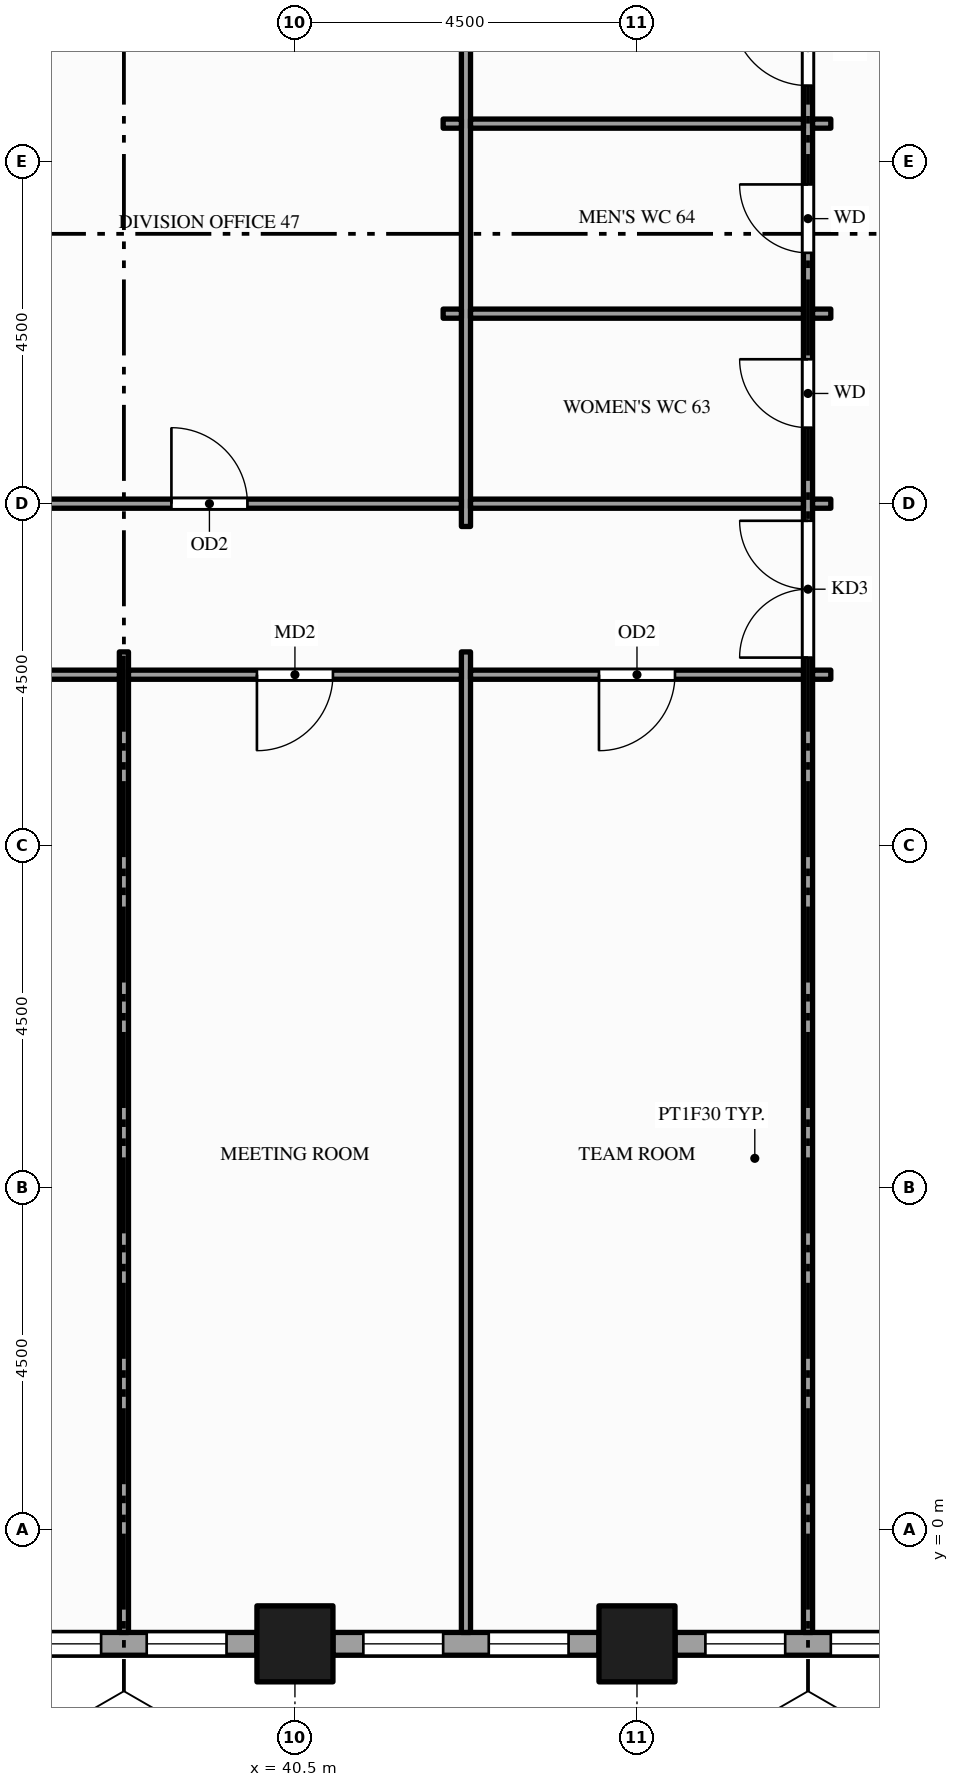
"""IFC4 building model, lengths in metres.
Left out: names, types, materials, properties, quantities, classifications, styles, units other than length and angle.
Written with IfcOpenShell. Run it as: python <this file> out.ifc"""

import sys

from ifc_helpers import new_model, si_unit, direction, frame, frame_2d, origin, origin_2d, place, context, subcontext, project, spatial, rectangle, hollow_rectangle, extrude, element, fill, save


model = new_model("IFC4")
c1 = context("Model", 3, precision=1e-05, world=origin(), true_north=direction((0.0, 1.0)))
c2 = subcontext(c1, "Body", "Model", "MODEL_VIEW")
j1 = project(units=[si_unit("LENGTHUNIT", "METRE"), si_unit("PLANEANGLEUNIT", "RADIAN")], contexts=[c1])
p1 = place(None, origin())
s1 = spatial("IfcSite", under=j1, at=p1, CompositionType="ELEMENT")
p2 = place(p1, origin())
s2 = spatial("IfcBuilding", under=s1, at=p2, CompositionType="ELEMENT")
p3 = place(p2, frame((0.0, 0.0, 127.0)))
s3 = spatial("IfcBuildingStorey", under=s2, at=p3, CompositionType="ELEMENT", Elevation=127.0)
for number, where, z_axis, x_axis in (
    (1, (40.5, -1.5, -0.15), (0.0, 0.0, 1.0), (1.0, 0.0, 0.0)),
    (2, (45.0, -1.5, -0.15), (0.0, 0.0, 1.0), (1.0, 0.0, 0.0)),
):
    element("IfcColumn", number, at=place(p3, frame(where, z_axis=z_axis, x_axis=x_axis)), inside=s3, PredefinedType="COLUMN", context=c2, shape_type="SweptSolid", body=[
        extrude(hollow_rectangle(XDim=1.0, YDim=1.0, WallThickness=0.05, at=origin_2d()), origin(), (0.0, 0.0, 1.0), 3.9),
    ])
p4 = place(p3, frame((36.5, -1.5, 0.0), z_axis=(0.0, 0.0, 1.0), x_axis=(1.0, 0.0, 0.0)))
e3 = element("IfcWall", 3, at=p4, inside=s3, PredefinedType="STANDARD", context=c2, shape_type="SweptSolid", body=[
    extrude(rectangle(XDim=3.5, YDim=0.3, at=frame_2d((1.75, 0.0))), origin(), (0.0, 0.0, 1.0), 3.054),
])
p5 = place(p4, frame((0.4, 0.0, 0.9)))
e4 = element("IfcOpeningElement", 4, at=p5, cuts=e3, PredefinedType="OPENING", context=c2, shape_type="SweptSolid", body=[
    extrude(rectangle(XDim=1.05, YDim=2.0, at=frame_2d((0.525, 1.0))), frame((0.0, 0.16, 0.0), z_axis=(0.0, -1.0, 0.0), x_axis=(1.0, 0.0, 0.0)), (0.0, 0.0, 1.0), 0.32),
])
p6 = place(p4, frame((2.05, 0.0, 0.9)))
e5 = element("IfcOpeningElement", 5, at=p6, cuts=e3, PredefinedType="OPENING", context=c2, shape_type="SweptSolid", body=[
    extrude(rectangle(XDim=1.05, YDim=2.0, at=frame_2d((0.525, 1.0))), frame((0.0, 0.16, 0.0), z_axis=(0.0, -1.0, 0.0), x_axis=(1.0, 0.0, 0.0)), (0.0, 0.0, 1.0), 0.32),
])
p7 = place(p3, frame((41.0, -1.5, 0.0), z_axis=(0.0, 0.0, 1.0), x_axis=(1.0, 0.0, 0.0)))
e6 = element("IfcWall", 6, at=p7, inside=s3, PredefinedType="STANDARD", context=c2, shape_type="SweptSolid", body=[
    extrude(rectangle(XDim=3.5, YDim=0.3, at=frame_2d((1.75, 0.0))), origin(), (0.0, 0.0, 1.0), 3.054),
])
p8 = place(p7, frame((0.4, 0.0, 0.9)))
e7 = element("IfcOpeningElement", 7, at=p8, cuts=e6, PredefinedType="OPENING", context=c2, shape_type="SweptSolid", body=[
    extrude(rectangle(XDim=1.05, YDim=2.0, at=frame_2d((0.525, 1.0))), frame((0.0, 0.16, 0.0), z_axis=(0.0, -1.0, 0.0), x_axis=(1.0, 0.0, 0.0)), (0.0, 0.0, 1.0), 0.32),
])
p9 = place(p7, frame((2.05, 0.0, 0.9)))
e8 = element("IfcOpeningElement", 8, at=p9, cuts=e6, PredefinedType="OPENING", context=c2, shape_type="SweptSolid", body=[
    extrude(rectangle(XDim=1.05, YDim=2.0, at=frame_2d((0.525, 1.0))), frame((0.0, 0.16, 0.0), z_axis=(0.0, -1.0, 0.0), x_axis=(1.0, 0.0, 0.0)), (0.0, 0.0, 1.0), 0.32),
])
p10 = place(p3, frame((45.5, -1.5, 0.0), z_axis=(0.0, 0.0, 1.0), x_axis=(1.0, 0.0, 0.0)))
e9 = element("IfcWall", 9, at=p10, inside=s3, PredefinedType="STANDARD", context=c2, shape_type="SweptSolid", body=[
    extrude(rectangle(XDim=3.5, YDim=0.3, at=frame_2d((1.75, 0.0))), origin(), (0.0, 0.0, 1.0), 3.054),
])
p11 = place(p10, frame((0.4, 0.0, 0.9)))
e10 = element("IfcOpeningElement", 10, at=p11, cuts=e9, PredefinedType="OPENING", context=c2, shape_type="SweptSolid", body=[
    extrude(rectangle(XDim=1.05, YDim=2.0, at=frame_2d((0.525, 1.0))), frame((0.0, 0.16, 0.0), z_axis=(0.0, -1.0, 0.0), x_axis=(1.0, 0.0, 0.0)), (0.0, 0.0, 1.0), 0.32),
])
p12 = place(p10, frame((2.05, 0.0, 0.9)))
e11 = element("IfcOpeningElement", 11, at=p12, cuts=e9, PredefinedType="OPENING", context=c2, shape_type="SweptSolid", body=[
    extrude(rectangle(XDim=1.05, YDim=2.0, at=frame_2d((0.525, 1.0))), frame((0.0, 0.16, 0.0), z_axis=(0.0, -1.0, 0.0), x_axis=(1.0, 0.0, 0.0)), (0.0, 0.0, 1.0), 0.32),
])
for number, where, z_axis, x_axis in (
    (12, (38.25, -1.35, 0.0), (0.0, 0.0, 1.0), (0.0, 1.0, 0.0)),
    (13, (42.75, -1.35, 0.0), (0.0, 0.0, 1.0), (0.0, 1.0, 0.0)),
):
    element("IfcWall", number, at=place(p3, frame(where, z_axis=z_axis, x_axis=x_axis)), inside=s3, PredefinedType="PARTITIONING", context=c2, shape_type="SweptSolid", body=[
        extrude(rectangle(XDim=12.9, YDim=0.12, at=frame_2d((6.45, 0.0))), origin(), (0.0, 0.0, 1.0), 2.838),
    ])
p13 = place(p3, frame((42.75, 13.2, 0.0), z_axis=(0.0, 0.0, 1.0), x_axis=(0.0, 1.0, 0.0)))
e14 = element("IfcWall", 14, at=p13, inside=s3, PredefinedType="PARTITIONING", context=c2, shape_type="SweptSolid", body=[
    extrude(rectangle(XDim=7.65, YDim=0.12, at=frame_2d((3.825, 0.0))), origin(), (0.0, 0.0, 1.0), 2.838),
])
p14 = place(p3, frame((47.25, -1.35, 0.0), z_axis=(0.0, 0.0, 1.0), x_axis=(0.0, 1.0, 0.0)))
e15 = element("IfcWall", 15, at=p14, inside=s3, PredefinedType="PARTITIONING", context=c2, shape_type="SweptSolid", body=[
    extrude(rectangle(XDim=22.2, YDim=0.12, at=frame_2d((11.1, 0.0))), origin(), (0.0, 0.0, 1.0), 2.838),
])
p15 = place(p14, frame((12.825, 0.0, 0.0)))
e16 = element("IfcOpeningElement", 16, at=p15, cuts=e15, PredefinedType="OPENING", context=c2, shape_type="SweptSolid", body=[
    extrude(rectangle(XDim=1.8, YDim=2.1, at=frame_2d((0.9, 1.05))), frame((0.0, 0.07, 0.0), z_axis=(0.0, -1.0, 0.0), x_axis=(1.0, 0.0, 0.0)), (0.0, 0.0, 1.0), 0.14),
])
p16 = place(p14, frame((15.85, 0.0, 0.0)))
e17 = element("IfcOpeningElement", 17, at=p16, cuts=e15, PredefinedType="OPENING", context=c2, shape_type="SweptSolid", body=[
    extrude(rectangle(XDim=0.9, YDim=2.1, at=frame_2d((0.45, 1.05))), frame((0.0, 0.07, 0.0), z_axis=(0.0, -1.0, 0.0), x_axis=(1.0, 0.0, 0.0)), (0.0, 0.0, 1.0), 0.14),
])
p17 = place(p14, frame((18.15, 0.0, 0.0)))
e18 = element("IfcOpeningElement", 18, at=p17, cuts=e15, PredefinedType="OPENING", context=c2, shape_type="SweptSolid", body=[
    extrude(rectangle(XDim=0.9, YDim=2.1, at=frame_2d((0.45, 1.05))), frame((0.0, 0.07, 0.0), z_axis=(0.0, -1.0, 0.0), x_axis=(1.0, 0.0, 0.0)), (0.0, 0.0, 1.0), 0.14),
])
p18 = place(p14, frame((20.35, 0.0, 0.0)))
e19 = element("IfcOpeningElement", 19, at=p18, cuts=e15, PredefinedType="OPENING", context=c2, shape_type="SweptSolid", body=[
    extrude(rectangle(XDim=1.0, YDim=2.1, at=frame_2d((0.5, 1.05))), frame((0.0, 0.07, 0.0), z_axis=(0.0, -1.0, 0.0), x_axis=(1.0, 0.0, 0.0)), (0.0, 0.0, 1.0), 0.14),
])
p19 = place(p3, frame((31.56, 11.25, 0.0), z_axis=(0.0, 0.0, 1.0), x_axis=(1.0, 0.0, 0.0)))
e20 = element("IfcWall", 20, at=p19, inside=s3, PredefinedType="PARTITIONING", context=c2, shape_type="SweptSolid", body=[
    extrude(rectangle(XDim=6.63, YDim=0.12, at=frame_2d((3.315, 0.0))), origin(), (0.0, 0.0, 1.0), 2.838),
])
p20 = place(p19, frame((2.865, 0.0, 0.0)))
e21 = element("IfcOpeningElement", 21, at=p20, cuts=e20, PredefinedType="OPENING", context=c2, shape_type="SweptSolid", body=[
    extrude(rectangle(XDim=0.9, YDim=2.1, at=frame_2d((0.45, 1.05))), frame((0.0, 0.07, 0.0), z_axis=(0.0, -1.0, 0.0), x_axis=(1.0, 0.0, 0.0)), (0.0, 0.0, 1.0), 0.14),
])
p21 = place(p3, frame((38.31, 11.25, 0.0), z_axis=(0.0, 0.0, 1.0), x_axis=(1.0, 0.0, 0.0)))
e22 = element("IfcWall", 22, at=p21, inside=s3, PredefinedType="PARTITIONING", context=c2, shape_type="SweptSolid", body=[
    extrude(rectangle(XDim=4.38, YDim=0.12, at=frame_2d((2.19, 0.0))), origin(), (0.0, 0.0, 1.0), 2.838),
])
p22 = place(p21, frame((1.69, 0.0, 0.0)))
e23 = element("IfcOpeningElement", 23, at=p22, cuts=e22, PredefinedType="OPENING", context=c2, shape_type="SweptSolid", body=[
    extrude(rectangle(XDim=1.0, YDim=2.1, at=frame_2d((0.5, 1.05))), frame((0.0, 0.07, 0.0), z_axis=(0.0, -1.0, 0.0), x_axis=(1.0, 0.0, 0.0)), (0.0, 0.0, 1.0), 0.14),
])
p23 = place(p3, frame((42.81, 11.25, 0.0), z_axis=(0.0, 0.0, 1.0), x_axis=(1.0, 0.0, 0.0)))
e24 = element("IfcWall", 24, at=p23, inside=s3, PredefinedType="PARTITIONING", context=c2, shape_type="SweptSolid", body=[
    extrude(rectangle(XDim=4.38, YDim=0.12, at=frame_2d((2.19, 0.0))), origin(), (0.0, 0.0, 1.0), 2.838),
])
p24 = place(p23, frame((1.69, 0.0, 0.0)))
e25 = element("IfcOpeningElement", 25, at=p24, cuts=e24, PredefinedType="OPENING", context=c2, shape_type="SweptSolid", body=[
    extrude(rectangle(XDim=1.0, YDim=2.1, at=frame_2d((0.5, 1.05))), frame((0.0, 0.07, 0.0), z_axis=(0.0, -1.0, 0.0), x_axis=(1.0, 0.0, 0.0)), (0.0, 0.0, 1.0), 0.14),
])
p25 = place(p3, frame((47.31, 11.25, 0.0), z_axis=(0.0, 0.0, 1.0), x_axis=(1.0, 0.0, 0.0)))
e26 = element("IfcWall", 26, at=p25, inside=s3, PredefinedType="PARTITIONING", context=c2, shape_type="SweptSolid", body=[
    extrude(rectangle(XDim=0.24, YDim=0.12, at=frame_2d((0.12, 0.0))), origin(), (0.0, 0.0, 1.0), 2.838),
])
p26 = place(p3, frame((36.06, 13.5, 0.0), z_axis=(0.0, 0.0, 1.0), x_axis=(1.0, 0.0, 0.0)))
e27 = element("IfcWall", 27, at=p26, inside=s3, PredefinedType="PARTITIONING", context=c2, shape_type="SweptSolid", body=[
    extrude(rectangle(XDim=6.63, YDim=0.12, at=frame_2d((3.315, 0.0))), origin(), (0.0, 0.0, 1.0), 2.838),
])
p27 = place(p26, frame((2.815, 0.0, 0.0)))
e28 = element("IfcOpeningElement", 28, at=p27, cuts=e27, PredefinedType="OPENING", context=c2, shape_type="SweptSolid", body=[
    extrude(rectangle(XDim=1.0, YDim=2.1, at=frame_2d((0.5, 1.05))), frame((0.0, 0.07, 0.0), z_axis=(0.0, -1.0, 0.0), x_axis=(1.0, 0.0, 0.0)), (0.0, 0.0, 1.0), 0.14),
])
p28 = place(p3, frame((42.81, 13.5, 0.0), z_axis=(0.0, 0.0, 1.0), x_axis=(1.0, 0.0, 0.0)))
e29 = element("IfcWall", 29, at=p28, inside=s3, PredefinedType="PARTITIONING", context=c2, shape_type="SweptSolid", body=[
    extrude(rectangle(XDim=4.38, YDim=0.12, at=frame_2d((2.19, 0.0))), origin(), (0.0, 0.0, 1.0), 2.838),
])
for number, where, z_axis, x_axis in (
    (30, (47.31, 13.5, 0.0), (0.0, 0.0, 1.0), (1.0, 0.0, 0.0)),
    (31, (42.45, 16.0, 0.0), (0.0, 0.0, 1.0), (1.0, 0.0, 0.0)),
):
    element("IfcWall", number, at=place(p3, frame(where, z_axis=z_axis, x_axis=x_axis)), inside=s3, PredefinedType="PARTITIONING", context=c2, shape_type="SweptSolid", body=[
        extrude(rectangle(XDim=0.24, YDim=0.12, at=frame_2d((0.12, 0.0))), origin(), (0.0, 0.0, 1.0), 2.838),
    ])
p29 = place(p3, frame((42.81, 16.0, 0.0), z_axis=(0.0, 0.0, 1.0), x_axis=(1.0, 0.0, 0.0)))
e32 = element("IfcWall", 32, at=p29, inside=s3, PredefinedType="PARTITIONING", context=c2, shape_type="SweptSolid", body=[
    extrude(rectangle(XDim=4.38, YDim=0.12, at=frame_2d((2.19, 0.0))), origin(), (0.0, 0.0, 1.0), 2.838),
])
for number, where, z_axis, x_axis in (
    (33, (47.31, 16.0, 0.0), (0.0, 0.0, 1.0), (1.0, 0.0, 0.0)),
    (34, (42.45, 18.5, 0.0), (0.0, 0.0, 1.0), (1.0, 0.0, 0.0)),
):
    element("IfcWall", number, at=place(p3, frame(where, z_axis=z_axis, x_axis=x_axis)), inside=s3, PredefinedType="PARTITIONING", context=c2, shape_type="SweptSolid", body=[
        extrude(rectangle(XDim=0.24, YDim=0.12, at=frame_2d((0.12, 0.0))), origin(), (0.0, 0.0, 1.0), 2.838),
    ])
p30 = place(p3, frame((42.81, 18.5, 0.0), z_axis=(0.0, 0.0, 1.0), x_axis=(1.0, 0.0, 0.0)))
e35 = element("IfcWall", 35, at=p30, inside=s3, PredefinedType="PARTITIONING", context=c2, shape_type="SweptSolid", body=[
    extrude(rectangle(XDim=4.38, YDim=0.12, at=frame_2d((2.19, 0.0))), origin(), (0.0, 0.0, 1.0), 2.838),
])
p31 = place(p3, frame((47.31, 18.5, 0.0), z_axis=(0.0, 0.0, 1.0), x_axis=(1.0, 0.0, 0.0)))
e36 = element("IfcWall", 36, at=p31, inside=s3, PredefinedType="PARTITIONING", context=c2, shape_type="SweptSolid", body=[
    extrude(rectangle(XDim=0.24, YDim=0.12, at=frame_2d((0.12, 0.0))), origin(), (0.0, 0.0, 1.0), 2.838),
])
p32 = place(p5, origin())
e37 = element("IfcWindow", 37, at=p32, inside=s3, PartitioningType="SINGLE_PANEL", PredefinedType="WINDOW", context=c2, shape_type="SweptSolid", body=[
    extrude(rectangle(XDim=1.05, YDim=2.0, at=frame_2d((0.525, 1.0))), frame((0.0, 0.03, 0.0), z_axis=(0.0, -1.0, 0.0), x_axis=(1.0, 0.0, 0.0)), (0.0, 0.0, 1.0), 0.06),
])
fill(e4, e37)
p33 = place(p6, origin())
e38 = element("IfcWindow", 38, at=p33, inside=s3, PartitioningType="SINGLE_PANEL", PredefinedType="WINDOW", context=c2, shape_type="SweptSolid", body=[
    extrude(rectangle(XDim=1.05, YDim=2.0, at=frame_2d((0.525, 1.0))), frame((0.0, 0.03, 0.0), z_axis=(0.0, -1.0, 0.0), x_axis=(1.0, 0.0, 0.0)), (0.0, 0.0, 1.0), 0.06),
])
fill(e5, e38)
p34 = place(p8, origin())
e39 = element("IfcWindow", 39, at=p34, inside=s3, PartitioningType="SINGLE_PANEL", PredefinedType="WINDOW", context=c2, shape_type="SweptSolid", body=[
    extrude(rectangle(XDim=1.05, YDim=2.0, at=frame_2d((0.525, 1.0))), frame((0.0, 0.03, 0.0), z_axis=(0.0, -1.0, 0.0), x_axis=(1.0, 0.0, 0.0)), (0.0, 0.0, 1.0), 0.06),
])
fill(e7, e39)
p35 = place(p9, origin())
e40 = element("IfcWindow", 40, at=p35, inside=s3, PartitioningType="SINGLE_PANEL", PredefinedType="WINDOW", context=c2, shape_type="SweptSolid", body=[
    extrude(rectangle(XDim=1.05, YDim=2.0, at=frame_2d((0.525, 1.0))), frame((0.0, 0.03, 0.0), z_axis=(0.0, -1.0, 0.0), x_axis=(1.0, 0.0, 0.0)), (0.0, 0.0, 1.0), 0.06),
])
fill(e8, e40)
p36 = place(p11, origin())
e41 = element("IfcWindow", 41, at=p36, inside=s3, PartitioningType="SINGLE_PANEL", PredefinedType="WINDOW", context=c2, shape_type="SweptSolid", body=[
    extrude(rectangle(XDim=1.05, YDim=2.0, at=frame_2d((0.525, 1.0))), frame((0.0, 0.03, 0.0), z_axis=(0.0, -1.0, 0.0), x_axis=(1.0, 0.0, 0.0)), (0.0, 0.0, 1.0), 0.06),
])
fill(e10, e41)
p37 = place(p12, origin())
e42 = element("IfcWindow", 42, at=p37, inside=s3, PartitioningType="SINGLE_PANEL", PredefinedType="WINDOW", context=c2, shape_type="SweptSolid", body=[
    extrude(rectangle(XDim=1.05, YDim=2.0, at=frame_2d((0.525, 1.0))), frame((0.0, 0.03, 0.0), z_axis=(0.0, -1.0, 0.0), x_axis=(1.0, 0.0, 0.0)), (0.0, 0.0, 1.0), 0.06),
])
fill(e11, e42)
p38 = place(p15, origin())
e43 = element("IfcDoor", 43, at=p38, inside=s3, OperationType="DOUBLE_DOOR_SINGLE_SWING", PredefinedType="DOOR", context=c2, shape_type="SweptSolid", body=[
    extrude(rectangle(XDim=1.8, YDim=2.1, at=frame_2d((0.9, 1.05))), frame((0.0, 0.025, 0.0), z_axis=(0.0, -1.0, 0.0), x_axis=(1.0, 0.0, 0.0)), (0.0, 0.0, 1.0), 0.05),
])
fill(e16, e43)
p39 = place(p22, origin())
e44 = element("IfcDoor", 44, at=p39, inside=s3, OperationType="SINGLE_SWING_LEFT", PredefinedType="DOOR", context=c2, shape_type="SweptSolid", body=[
    extrude(rectangle(XDim=1.0, YDim=2.1, at=frame_2d((0.5, 1.05))), frame((0.0, 0.025, 0.0), z_axis=(0.0, -1.0, 0.0), x_axis=(1.0, 0.0, 0.0)), (0.0, 0.0, 1.0), 0.05),
])
fill(e23, e44)
p40 = place(p24, origin())
e45 = element("IfcDoor", 45, at=p40, inside=s3, OperationType="SINGLE_SWING_LEFT", PredefinedType="DOOR", context=c2, shape_type="SweptSolid", body=[
    extrude(rectangle(XDim=1.0, YDim=2.1, at=frame_2d((0.5, 1.05))), frame((0.0, 0.025, 0.0), z_axis=(0.0, -1.0, 0.0), x_axis=(1.0, 0.0, 0.0)), (0.0, 0.0, 1.0), 0.05),
])
fill(e25, e45)
p41 = place(p27, origin())
e46 = element("IfcDoor", 46, at=p41, inside=s3, OperationType="SINGLE_SWING_LEFT", PredefinedType="DOOR", context=c2, shape_type="SweptSolid", body=[
    extrude(rectangle(XDim=1.0, YDim=2.1, at=frame_2d((0.5, 1.05))), frame((0.0, 0.025, 0.0), z_axis=(0.0, -1.0, 0.0), x_axis=(1.0, 0.0, 0.0)), (0.0, 0.0, 1.0), 0.05),
])
fill(e28, e46)
p42 = place(p16, origin())
e47 = element("IfcDoor", 47, at=p42, inside=s3, OperationType="SINGLE_SWING_RIGHT", PredefinedType="DOOR", context=c2, shape_type="SweptSolid", body=[
    extrude(rectangle(XDim=0.9, YDim=2.1, at=frame_2d((0.45, 1.05))), frame((0.0, 0.025, 0.0), z_axis=(0.0, -1.0, 0.0), x_axis=(1.0, 0.0, 0.0)), (0.0, 0.0, 1.0), 0.05),
])
fill(e17, e47)
p43 = place(p17, origin())
e48 = element("IfcDoor", 48, at=p43, inside=s3, OperationType="SINGLE_SWING_RIGHT", PredefinedType="DOOR", context=c2, shape_type="SweptSolid", body=[
    extrude(rectangle(XDim=0.9, YDim=2.1, at=frame_2d((0.45, 1.05))), frame((0.0, 0.025, 0.0), z_axis=(0.0, -1.0, 0.0), x_axis=(1.0, 0.0, 0.0)), (0.0, 0.0, 1.0), 0.05),
])
fill(e18, e48)
p44 = place(p18, origin())
e49 = element("IfcDoor", 49, at=p44, inside=s3, OperationType="SINGLE_SWING_RIGHT", PredefinedType="DOOR", context=c2, shape_type="SweptSolid", body=[
    extrude(rectangle(XDim=1.0, YDim=2.1, at=frame_2d((0.5, 1.05))), frame((0.0, 0.025, 0.0), z_axis=(0.0, -1.0, 0.0), x_axis=(1.0, 0.0, 0.0)), (0.0, 0.0, 1.0), 0.05),
])
fill(e19, e49)
save(model, sys.argv[1])
